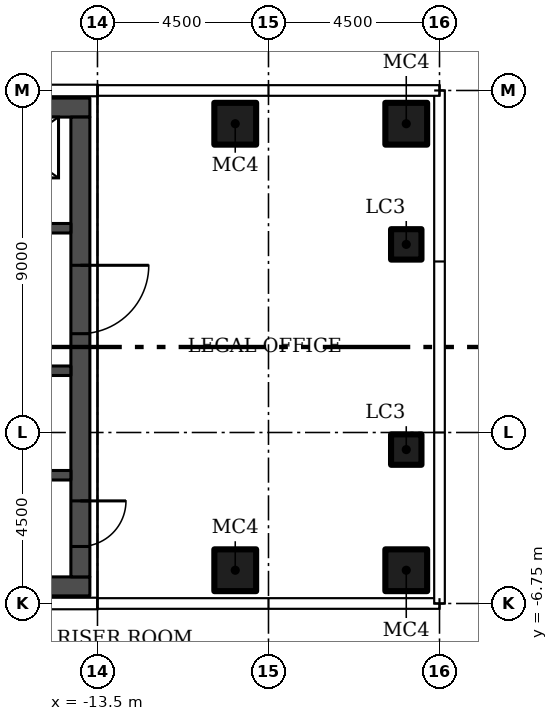
"""IFC4 building model, lengths in metres.
Left out: names, types, materials, properties, quantities, classifications, styles, units other than length and angle.
Written with IfcOpenShell. Run it as: python <this file> out.ifc"""

import sys

from ifc_helpers import new_model, si_unit, direction, frame, frame_2d, origin, origin_2d, place, context, subcontext, project, spatial, rectangle, hollow_rectangle, extrude, element, fill, save


model = new_model("IFC4")
c1 = context("Model", 3, precision=1e-05, world=origin(), true_north=direction((0.0, 1.0)))
c2 = subcontext(c1, "Body", "Model", "MODEL_VIEW")
j1 = project(units=[si_unit("LENGTHUNIT", "METRE"), si_unit("PLANEANGLEUNIT", "RADIAN")], contexts=[c1])
p1 = place(None, origin())
s1 = spatial("IfcSite", under=j1, at=p1, CompositionType="ELEMENT")
p2 = place(p1, origin())
s2 = spatial("IfcBuilding", under=s1, at=p2, CompositionType="ELEMENT")
p3 = place(p2, frame((0.0, 0.0, 174.0)))
s3 = spatial("IfcBuildingStorey", under=s2, at=p3, CompositionType="ELEMENT", Elevation=174.0)
for number, where in (
    (1, (-9.875, -5.875, 0.0)),
    (2, (-5.375, -5.875, 0.0)),
    (3, (-9.875, 5.875, 0.0)),
    (4, (-5.375, 5.875, 0.0)),
):
    element("IfcColumn", number, at=place(p3, frame(where)), inside=s3, PredefinedType="COLUMN", context=c2, shape_type="SweptSolid", body=[
        extrude(hollow_rectangle(XDim=1.1, YDim=1.1, WallThickness=0.04, at=origin_2d()), origin(), (0.0, 0.0, 1.0), 3.45),
    ])
for number, where in (
    (5, (-5.375, -2.7, 0.0)),
    (6, (-5.375, 2.7, 0.0)),
):
    element("IfcColumn", number, at=place(p3, frame(where)), inside=s3, PredefinedType="COLUMN", context=c2, shape_type="SweptSolid", body=[
        extrude(hollow_rectangle(XDim=0.8, YDim=0.8, WallThickness=0.03, at=origin_2d()), origin(), (0.0, 0.0, 1.0), 3.45),
    ])
for number, where in (
    (7, (-26.8, -6.3, 0.0)),
    (8, (-26.8, 6.3, 0.0)),
):
    element("IfcWall", number, at=place(p3, frame(where)), inside=s3, PredefinedType="SHEAR", context=c2, shape_type="SweptSolid", body=[
        extrude(rectangle(XDim=13.1, YDim=0.5, at=frame_2d((6.55, 0.0))), origin(), (0.0, 0.0, 1.0), 3.45),
    ])
p4 = place(p3, frame((-13.95, 6.05, 0.0), z_axis=(0.0, 0.0, 1.0), x_axis=(0.0, -1.0, 0.0)))
e9 = element("IfcWall", 9, at=p4, inside=s3, PredefinedType="SHEAR", context=c2, shape_type="SweptSolid", body=[
    extrude(rectangle(XDim=12.1, YDim=0.5, at=frame_2d((6.05, 0.0))), origin(), (0.0, 0.0, 1.0), 3.45),
])
p5 = place(p4, frame((10.1, 0.0, 0.0)))
e10 = element("IfcOpeningElement", 10, at=p5, cuts=e9, PredefinedType="OPENING", context=c2, shape_type="SweptSolid", body=[
    extrude(rectangle(XDim=1.2, YDim=2.1, at=frame_2d((0.6, 1.05))), frame((0.0, 0.26, 0.0), z_axis=(0.0, -1.0, 0.0), x_axis=(1.0, 0.0, 0.0)), (0.0, 0.0, 1.0), 0.52),
])
p6 = place(p4, frame((3.9, 0.0, 0.0)))
e11 = element("IfcOpeningElement", 11, at=p6, cuts=e9, PredefinedType="OPENING", context=c2, shape_type="SweptSolid", body=[
    extrude(rectangle(XDim=1.8, YDim=2.4, at=frame_2d((0.9, 1.2))), frame((0.0, 0.26, 0.0), z_axis=(0.0, -1.0, 0.0), x_axis=(1.0, 0.0, 0.0)), (0.0, 0.0, 1.0), 0.52),
])
p7 = place(p3, frame((-14.2, -3.375, 0.0), z_axis=(0.0, 0.0, 1.0), x_axis=(-1.0, 0.0, 0.0)))
e12 = element("IfcWall", 12, at=p7, inside=s3, PredefinedType="SHEAR", context=c2, shape_type="SweptSolid", body=[
    extrude(rectangle(XDim=12.1, YDim=0.25, at=frame_2d((6.05, 0.0))), origin(), (0.0, 0.0, 1.0), 3.45),
])
p8 = place(p7, frame((10.95, 0.0, 0.0)))
e13 = element("IfcOpeningElement", 13, at=p8, cuts=e12, PredefinedType="OPENING", context=c2, shape_type="SweptSolid", body=[
    extrude(rectangle(XDim=1.1, YDim=2.1, at=frame_2d((0.55, 1.05))), frame((0.0, 0.135, 0.0), z_axis=(0.0, -1.0, 0.0), x_axis=(1.0, 0.0, 0.0)), (0.0, 0.0, 1.0), 0.27),
])
p9 = place(p3, frame((-14.2, -0.625, 0.0), z_axis=(0.0, 0.0, 1.0), x_axis=(-1.0, 0.0, 0.0)))
e14 = element("IfcWall", 14, at=p9, inside=s3, PredefinedType="SHEAR", context=c2, shape_type="SweptSolid", body=[
    extrude(rectangle(XDim=12.1, YDim=0.25, at=frame_2d((6.05, 0.0))), origin(), (0.0, 0.0, 1.0), 3.45),
])
p10 = place(p9, frame((8.65, 0.0, 0.0)))
e15 = element("IfcOpeningElement", 15, at=p10, cuts=e14, PredefinedType="OPENING", context=c2, shape_type="SweptSolid", body=[
    extrude(rectangle(XDim=1.2, YDim=2.1, at=frame_2d((0.6, 1.05))), frame((0.0, 0.135, 0.0), z_axis=(0.0, -1.0, 0.0), x_axis=(1.0, 0.0, 0.0)), (0.0, 0.0, 1.0), 0.27),
])
p11 = place(p9, frame((1.175, 0.0, 0.0)))
e16 = element("IfcOpeningElement", 16, at=p11, cuts=e14, PredefinedType="OPENING", context=c2, shape_type="SweptSolid", body=[
    extrude(rectangle(XDim=0.9, YDim=2.1, at=frame_2d((0.45, 1.05))), frame((0.0, 0.135, 0.0), z_axis=(0.0, -1.0, 0.0), x_axis=(1.0, 0.0, 0.0)), (0.0, 0.0, 1.0), 0.27),
])
p12 = place(p3, frame((-26.3, 3.125, 0.0)))
e17 = element("IfcWall", 17, at=p12, inside=s3, PredefinedType="SHEAR", context=c2, shape_type="SweptSolid", body=[
    extrude(rectangle(XDim=12.1, YDim=0.25, at=frame_2d((6.05, 0.0))), origin(), (0.0, 0.0, 1.0), 3.45),
])
p13 = place(p12, frame((6.95, 0.0, 0.0)))
e18 = element("IfcOpeningElement", 18, at=p13, cuts=e17, PredefinedType="OPENING", context=c2, shape_type="SweptSolid", body=[
    extrude(rectangle(XDim=1.1, YDim=2.1, at=frame_2d((0.55, 1.05))), frame((0.0, 0.135, 0.0), z_axis=(0.0, -1.0, 0.0), x_axis=(1.0, 0.0, 0.0)), (0.0, 0.0, 1.0), 0.27),
])
p14 = place(p12, frame((10.075, 0.0, 0.0)))
e19 = element("IfcOpeningElement", 19, at=p14, cuts=e17, PredefinedType="OPENING", context=c2, shape_type="SweptSolid", body=[
    extrude(rectangle(XDim=1.1, YDim=2.1, at=frame_2d((0.55, 1.05))), frame((0.0, 0.135, 0.0), z_axis=(0.0, -1.0, 0.0), x_axis=(1.0, 0.0, 0.0)), (0.0, 0.0, 1.0), 0.27),
])
p15 = place(p12, frame((2.475, 0.0, 0.0)))
e20 = element("IfcOpeningElement", 20, at=p15, cuts=e17, PredefinedType="OPENING", context=c2, shape_type="SweptSolid", body=[
    extrude(rectangle(XDim=0.9, YDim=2.1, at=frame_2d((0.45, 1.05))), frame((0.0, 0.135, 0.0), z_axis=(0.0, -1.0, 0.0), x_axis=(1.0, 0.0, 0.0)), (0.0, 0.0, 1.0), 0.27),
])
p16 = place(p5, origin())
e21 = element("IfcDoor", 21, at=p16, inside=s3, OperationType="SINGLE_SWING_RIGHT", PredefinedType="DOOR", context=c2, shape_type="SweptSolid", body=[
    extrude(rectangle(XDim=1.2, YDim=2.1, at=frame_2d((0.6, 1.05))), frame((0.0, 0.025, 0.0), z_axis=(0.0, -1.0, 0.0), x_axis=(1.0, 0.0, 0.0)), (0.0, 0.0, 1.0), 0.05),
])
fill(e10, e21)
p17 = place(p6, origin())
e22 = element("IfcDoor", 22, at=p17, inside=s3, OperationType="DOUBLE_DOOR_SINGLE_SWING", PredefinedType="DOOR", context=c2, shape_type="SweptSolid", body=[
    extrude(rectangle(XDim=1.8, YDim=2.4, at=frame_2d((0.9, 1.2))), frame((0.0, 0.025, 0.0), z_axis=(0.0, -1.0, 0.0), x_axis=(1.0, 0.0, 0.0)), (0.0, 0.0, 1.0), 0.05),
])
fill(e11, e22)
save(model, sys.argv[1])
